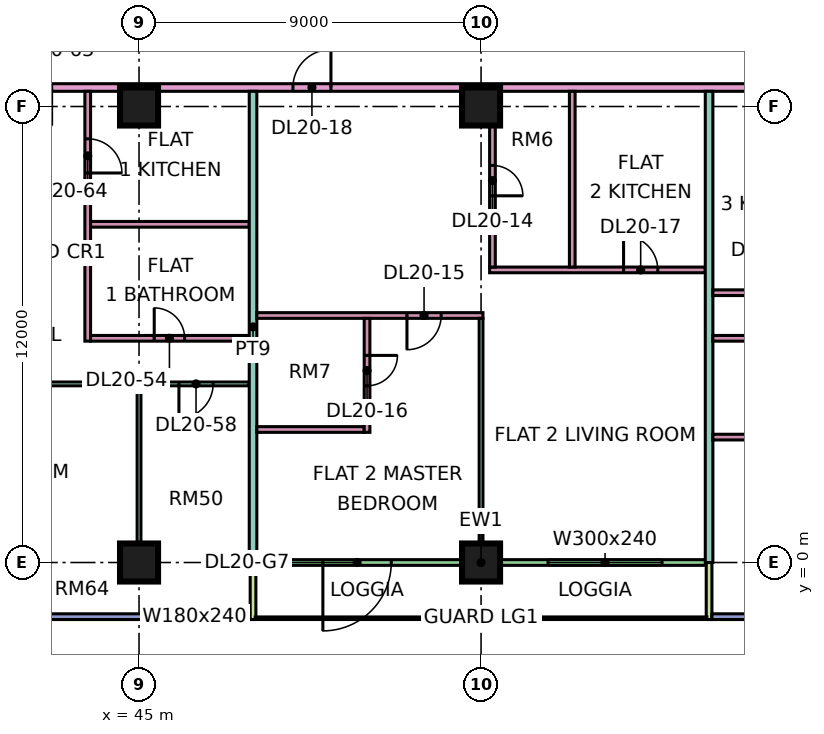
"""IFC4 building model, lengths in metres.
Left out: names, types, materials, properties, quantities, classifications, styles, units other than length and angle.
Written with IfcOpenShell. Run it as: python <this file> out.ifc"""

import sys

from ifc_helpers import new_model, si_unit, direction, frame, frame_2d, origin, origin_2d, place, context, subcontext, project, spatial, rectangle, extrude, element, fill, save


model = new_model("IFC4")
c1 = context("Model", 3, precision=1e-05, world=origin(), true_north=direction((0.0, 1.0)))
c2 = subcontext(c1, "Body", "Model", "MODEL_VIEW")
j1 = project(units=[si_unit("LENGTHUNIT", "METRE"), si_unit("PLANEANGLEUNIT", "RADIAN")], contexts=[c1])
p1 = place(None, origin())
s1 = spatial("IfcSite", under=j1, at=p1, CompositionType="ELEMENT")
p2 = place(p1, origin())
s2 = spatial("IfcBuilding", under=s1, at=p2, CompositionType="ELEMENT")
p3 = place(p2, frame((0.0, 0.0, 91.9)))
s3 = spatial("IfcBuildingStorey", under=s2, at=p3, CompositionType="ELEMENT", Elevation=91.9)
for number, where, z_axis, x_axis in (
    (1, (45.0, 0.0, 0.0), (0.0, 0.0, 1.0), (1.0, 0.0, 0.0)),
    (2, (45.0, 12.0, 0.0), (0.0, 0.0, 1.0), (1.0, 0.0, 0.0)),
    (3, (54.0, 0.0, 0.0), (0.0, 0.0, 1.0), (1.0, 0.0, 0.0)),
    (4, (54.0, 12.0, 0.0), (0.0, 0.0, 1.0), (1.0, 0.0, 0.0)),
):
    element("IfcColumn", number, at=place(p3, frame(where, z_axis=z_axis, x_axis=x_axis)), inside=s3, PredefinedType="COLUMN", context=c2, shape_type="SweptSolid", body=[
        extrude(rectangle(XDim=1.0, YDim=1.0, at=origin_2d()), origin(), (0.0, 0.0, 1.0), 3.75),
    ])
p4 = place(p3, frame((36.075, -1.425, 0.0), z_axis=(0.0, 0.0, 1.0), x_axis=(1.0, 0.0, 0.0)))
e5 = element("IfcWall", 5, at=p4, inside=s3, PredefinedType="SOLIDWALL", context=c2, shape_type="SweptSolid", body=[
    extrude(rectangle(XDim=11.85, YDim=0.15, at=frame_2d((5.925, 0.0))), origin(), (0.0, 0.0, 1.0), 3.35),
])
p5 = place(p4, frame((2.962, 0.0, 0.45)))
e6 = element("IfcOpeningElement", 6, at=p5, cuts=e5, PredefinedType="OPENING", context=c2, shape_type="SweptSolid", body=[
    extrude(rectangle(XDim=3.0, YDim=2.4, at=frame_2d((1.5, 1.2))), frame((0.0, 0.085, 0.0), z_axis=(0.0, -1.0, 0.0), x_axis=(1.0, 0.0, 0.0)), (0.0, 0.0, 1.0), 0.17),
])
p6 = place(p4, frame((9.488, 0.0, 0.45)))
e7 = element("IfcOpeningElement", 7, at=p6, cuts=e5, PredefinedType="OPENING", context=c2, shape_type="SweptSolid", body=[
    extrude(rectangle(XDim=1.8, YDim=2.4, at=frame_2d((0.9, 1.2))), frame((0.0, 0.085, 0.0), z_axis=(0.0, -1.0, 0.0), x_axis=(1.0, 0.0, 0.0)), (0.0, 0.0, 1.0), 0.17),
])
p7 = place(p3, frame((48.075, 0.0, 0.0), z_axis=(0.0, 0.0, 1.0), x_axis=(1.0, 0.0, 0.0)))
e8 = element("IfcWall", 8, at=p7, inside=s3, PredefinedType="SOLIDWALL", context=c2, shape_type="SweptSolid", body=[
    extrude(rectangle(XDim=11.85, YDim=0.15, at=frame_2d((5.925, 0.0))), origin(), (0.0, 0.0, 1.0), 3.35),
])
p8 = place(p7, frame((1.762, 0.0, 0.0)))
e9 = element("IfcOpeningElement", 9, at=p8, cuts=e8, PredefinedType="OPENING", context=c2, shape_type="SweptSolid", body=[
    extrude(rectangle(XDim=1.8, YDim=2.4, at=frame_2d((0.9, 1.2))), frame((0.0, 0.085, 0.0), z_axis=(0.0, -1.0, 0.0), x_axis=(1.0, 0.0, 0.0)), (0.0, 0.0, 1.0), 0.17),
])
p9 = place(p7, frame((7.688, 0.0, 0.45)))
e10 = element("IfcOpeningElement", 10, at=p9, cuts=e8, PredefinedType="OPENING", context=c2, shape_type="SweptSolid", body=[
    extrude(rectangle(XDim=3.0, YDim=2.4, at=frame_2d((1.5, 1.2))), frame((0.0, 0.085, 0.0), z_axis=(0.0, -1.0, 0.0), x_axis=(1.0, 0.0, 0.0)), (0.0, 0.0, 1.0), 0.17),
])
for number, where, z_axis, x_axis in (
    (11, (48.0, -1.5, 0.0), (0.0, 0.0, 1.0), (0.0, 1.0, 0.0)),
    (12, (60.0, -1.5, 0.0), (0.0, 0.0, 1.0), (0.0, 1.0, 0.0)),
):
    element("IfcWall", number, at=place(p3, frame(where, z_axis=z_axis, x_axis=x_axis)), inside=s3, PredefinedType="SOLIDWALL", context=c2, shape_type="SweptSolid", body=[
        extrude(rectangle(XDim=1.5, YDim=0.15, at=frame_2d((0.75, 0.0))), origin(), (0.0, 0.0, 1.0), 3.35),
    ])
p10 = place(p3, frame((60.075, -1.425, 0.0), z_axis=(0.0, 0.0, 1.0), x_axis=(1.0, 0.0, 0.0)))
e13 = element("IfcWall", 13, at=p10, inside=s3, PredefinedType="SOLIDWALL", context=c2, shape_type="SweptSolid", body=[
    extrude(rectangle(XDim=10.425, YDim=0.15, at=frame_2d((5.212, 0.0))), origin(), (0.0, 0.0, 1.0), 3.35),
])
p11 = place(p10, frame((1.462, 0.0, 0.45)))
e14 = element("IfcOpeningElement", 14, at=p11, cuts=e13, PredefinedType="OPENING", context=c2, shape_type="SweptSolid", body=[
    extrude(rectangle(XDim=3.0, YDim=2.4, at=frame_2d((1.5, 1.2))), frame((0.0, 0.085, 0.0), z_axis=(0.0, -1.0, 0.0), x_axis=(1.0, 0.0, 0.0)), (0.0, 0.0, 1.0), 0.17),
])
p12 = place(p10, frame((6.675, 0.0, 0.45)))
e15 = element("IfcOpeningElement", 15, at=p12, cuts=e13, PredefinedType="OPENING", context=c2, shape_type="SweptSolid", body=[
    extrude(rectangle(XDim=3.0, YDim=2.4, at=frame_2d((1.5, 1.2))), frame((0.0, 0.085, 0.0), z_axis=(0.0, -1.0, 0.0), x_axis=(1.0, 0.0, 0.0)), (0.0, 0.0, 1.0), 0.17),
])
p13 = place(p3, frame((33.05, 4.7, 0.0), z_axis=(0.0, 0.0, 1.0), x_axis=(1.0, 0.0, 0.0)))
e16 = element("IfcWall", 16, at=p13, inside=s3, PredefinedType="PARTITIONING", context=c2, shape_type="SweptSolid", body=[
    extrude(rectangle(XDim=14.85, YDim=0.1, at=frame_2d((7.425, 0.0))), origin(), (0.0, 0.0, 1.0), 3.35),
])
p14 = place(p13, frame((1.0, 0.0, 0.0)))
e17 = element("IfcOpeningElement", 17, at=p14, cuts=e16, PredefinedType="OPENING", context=c2, shape_type="SweptSolid", body=[
    extrude(rectangle(XDim=0.9, YDim=2.1, at=frame_2d((0.45, 1.05))), frame((0.0, 0.06, 0.0), z_axis=(0.0, -1.0, 0.0), x_axis=(1.0, 0.0, 0.0)), (0.0, 0.0, 1.0), 0.12),
])
p15 = place(p13, frame((13.0, 0.0, 0.0)))
e18 = element("IfcOpeningElement", 18, at=p15, cuts=e16, PredefinedType="OPENING", context=c2, shape_type="SweptSolid", body=[
    extrude(rectangle(XDim=0.9, YDim=2.1, at=frame_2d((0.45, 1.05))), frame((0.0, 0.06, 0.0), z_axis=(0.0, -1.0, 0.0), x_axis=(1.0, 0.0, 0.0)), (0.0, 0.0, 1.0), 0.12),
])
p16 = place(p13, frame((7.0, 0.0, 0.0)))
e19 = element("IfcOpeningElement", 19, at=p16, cuts=e16, PredefinedType="OPENING", context=c2, shape_type="SweptSolid", body=[
    extrude(rectangle(XDim=0.9, YDim=2.1, at=frame_2d((0.45, 1.05))), frame((0.0, 0.06, 0.0), z_axis=(0.0, -1.0, 0.0), x_axis=(1.0, 0.0, 0.0)), (0.0, 0.0, 1.0), 0.12),
])
p17 = place(p3, frame((40.65, 12.5, 0.0), z_axis=(0.0, 0.0, 1.0), x_axis=(1.0, 0.0, 0.0)))
e20 = element("IfcWall", 20, at=p17, inside=s3, PredefinedType="PARTITIONING", context=c2, shape_type="SweptSolid", body=[
    extrude(rectangle(XDim=24.825, YDim=0.2, at=frame_2d((12.413, 0.0))), origin(), (0.0, 0.0, 1.0), 3.35),
])
p18 = place(p17, frame((8.4, 0.0, 0.0)))
e21 = element("IfcOpeningElement", 21, at=p18, cuts=e20, PredefinedType="OPENING", context=c2, shape_type="SweptSolid", body=[
    extrude(rectangle(XDim=1.0, YDim=2.1, at=frame_2d((0.5, 1.05))), frame((0.0, 0.11, 0.0), z_axis=(0.0, -1.0, 0.0), x_axis=(1.0, 0.0, 0.0)), (0.0, 0.0, 1.0), 0.22),
])
p19 = place(p17, frame((1.05, 0.0, 0.0)))
e22 = element("IfcOpeningElement", 22, at=p19, cuts=e20, PredefinedType="OPENING", context=c2, shape_type="SweptSolid", body=[
    extrude(rectangle(XDim=1.0, YDim=2.1, at=frame_2d((0.5, 1.05))), frame((0.0, 0.11, 0.0), z_axis=(0.0, -1.0, 0.0), x_axis=(1.0, 0.0, 0.0)), (0.0, 0.0, 1.0), 0.22),
])
p20 = place(p3, frame((43.65, 5.825, 0.0), z_axis=(0.0, 0.0, 1.0), x_axis=(0.0, 1.0, 0.0)))
e23 = element("IfcWall", 23, at=p20, inside=s3, PredefinedType="PARTITIONING", context=c2, shape_type="SweptSolid", body=[
    extrude(rectangle(XDim=6.575, YDim=0.15, at=frame_2d((3.288, 0.0))), origin(), (0.0, 0.0, 1.0), 3.35),
])
p21 = place(p20, frame((4.425, 0.0, 0.0)))
e24 = element("IfcOpeningElement", 24, at=p21, cuts=e23, PredefinedType="OPENING", context=c2, shape_type="SweptSolid", body=[
    extrude(rectangle(XDim=0.9, YDim=2.1, at=frame_2d((0.45, 1.05))), frame((0.0, 0.085, 0.0), z_axis=(0.0, -1.0, 0.0), x_axis=(1.0, 0.0, 0.0)), (0.0, 0.0, 1.0), 0.17),
])
p22 = place(p3, frame((43.725, 5.9, 0.0), z_axis=(0.0, 0.0, 1.0), x_axis=(1.0, 0.0, 0.0)))
e25 = element("IfcWall", 25, at=p22, inside=s3, PredefinedType="PARTITIONING", context=c2, shape_type="SweptSolid", body=[
    extrude(rectangle(XDim=4.175, YDim=0.15, at=frame_2d((2.087, 0.0))), origin(), (0.0, 0.0, 1.0), 3.35),
])
p23 = place(p22, frame((1.675, 0.0, 0.0)))
e26 = element("IfcOpeningElement", 26, at=p23, cuts=e25, PredefinedType="OPENING", context=c2, shape_type="SweptSolid", body=[
    extrude(rectangle(XDim=0.8, YDim=2.1, at=frame_2d((0.4, 1.05))), frame((0.0, 0.085, 0.0), z_axis=(0.0, -1.0, 0.0), x_axis=(1.0, 0.0, 0.0)), (0.0, 0.0, 1.0), 0.17),
])
p24 = place(p3, frame((43.725, 8.9, 0.0), z_axis=(0.0, 0.0, 1.0), x_axis=(1.0, 0.0, 0.0)))
e27 = element("IfcWall", 27, at=p24, inside=s3, PredefinedType="PARTITIONING", context=c2, shape_type="SweptSolid", body=[
    extrude(rectangle(XDim=4.175, YDim=0.15, at=frame_2d((2.087, 0.0))), origin(), (0.0, 0.0, 1.0), 3.35),
])
p25 = place(p3, frame((45.0, 0.0, 0.0), z_axis=(0.0, 0.0, 1.0), x_axis=(0.0, 1.0, 0.0)))
e28 = element("IfcWall", 28, at=p25, inside=s3, PredefinedType="PARTITIONING", context=c2, shape_type="SweptSolid", body=[
    extrude(rectangle(XDim=4.65, YDim=0.1, at=frame_2d((2.325, 0.0))), origin(), (0.0, 0.0, 1.0), 3.35),
])
p26 = place(p3, frame((48.0, 0.0, 0.0), z_axis=(0.0, 0.0, 1.0), x_axis=(0.0, 1.0, 0.0)))
e29 = element("IfcWall", 29, at=p26, inside=s3, PredefinedType="PARTITIONING", context=c2, shape_type="SweptSolid", body=[
    extrude(rectangle(XDim=12.4, YDim=0.2, at=frame_2d((6.2, 0.0))), origin(), (0.0, 0.0, 1.0), 3.35),
])
p27 = place(p3, frame((48.1, 3.5, 0.0), z_axis=(0.0, 0.0, 1.0), x_axis=(1.0, 0.0, 0.0)))
e30 = element("IfcWall", 30, at=p27, inside=s3, PredefinedType="PARTITIONING", context=c2, shape_type="SweptSolid", body=[
    extrude(rectangle(XDim=2.825, YDim=0.15, at=frame_2d((1.413, 0.0))), origin(), (0.0, 0.0, 1.0), 3.35),
])
p28 = place(p3, frame((48.1, 6.5, 0.0), z_axis=(0.0, 0.0, 1.0), x_axis=(1.0, 0.0, 0.0)))
e31 = element("IfcWall", 31, at=p28, inside=s3, PredefinedType="PARTITIONING", context=c2, shape_type="SweptSolid", body=[
    extrude(rectangle(XDim=5.95, YDim=0.15, at=frame_2d((2.975, 0.0))), origin(), (0.0, 0.0, 1.0), 3.35),
])
p29 = place(p28, frame((3.95, 0.0, 0.0)))
e32 = element("IfcOpeningElement", 32, at=p29, cuts=e31, PredefinedType="OPENING", context=c2, shape_type="SweptSolid", body=[
    extrude(rectangle(XDim=0.9, YDim=2.1, at=frame_2d((0.45, 1.05))), frame((0.0, 0.085, 0.0), z_axis=(0.0, -1.0, 0.0), x_axis=(1.0, 0.0, 0.0)), (0.0, 0.0, 1.0), 0.17),
])
p30 = place(p3, frame((51.0, 3.425, 0.0), z_axis=(0.0, 0.0, 1.0), x_axis=(0.0, 1.0, 0.0)))
e33 = element("IfcWall", 33, at=p30, inside=s3, PredefinedType="PARTITIONING", context=c2, shape_type="SweptSolid", body=[
    extrude(rectangle(XDim=3.0, YDim=0.15, at=frame_2d((1.5, 0.0))), origin(), (0.0, 0.0, 1.0), 3.35),
])
p31 = place(p30, frame((1.225, 0.0, 0.0)))
e34 = element("IfcOpeningElement", 34, at=p31, cuts=e33, PredefinedType="OPENING", context=c2, shape_type="SweptSolid", body=[
    extrude(rectangle(XDim=0.8, YDim=2.1, at=frame_2d((0.4, 1.05))), frame((0.0, 0.085, 0.0), z_axis=(0.0, -1.0, 0.0), x_axis=(1.0, 0.0, 0.0)), (0.0, 0.0, 1.0), 0.17),
])
p32 = place(p3, frame((54.0, 0.074, 0.0), z_axis=(0.0, 0.0, 1.0), x_axis=(0.0, 1.0, 0.0)))
e35 = element("IfcWall", 35, at=p32, inside=s3, PredefinedType="PARTITIONING", context=c2, shape_type="SweptSolid", body=[
    extrude(rectangle(XDim=6.351, YDim=0.1, at=frame_2d((3.176, 0.0))), origin(), (0.0, 0.0, 1.0), 3.35),
])
p33 = place(p3, frame((54.225, 7.7, 0.0), z_axis=(0.0, 0.0, 1.0), x_axis=(1.0, 0.0, 0.0)))
e36 = element("IfcWall", 36, at=p33, inside=s3, PredefinedType="PARTITIONING", context=c2, shape_type="SweptSolid", body=[
    extrude(rectangle(XDim=5.675, YDim=0.15, at=frame_2d((2.837, 0.0))), origin(), (0.0, 0.0, 1.0), 3.35),
])
p34 = place(p33, frame((3.525, 0.0, 0.0)))
e37 = element("IfcOpeningElement", 37, at=p34, cuts=e36, PredefinedType="OPENING", context=c2, shape_type="SweptSolid", body=[
    extrude(rectangle(XDim=0.9, YDim=2.1, at=frame_2d((0.45, 1.05))), frame((0.0, 0.085, 0.0), z_axis=(0.0, -1.0, 0.0), x_axis=(1.0, 0.0, 0.0)), (0.0, 0.0, 1.0), 0.17),
])
p35 = place(p3, frame((54.3, 7.775, 0.0), z_axis=(0.0, 0.0, 1.0), x_axis=(0.0, 1.0, 0.0)))
e38 = element("IfcWall", 38, at=p35, inside=s3, PredefinedType="PARTITIONING", context=c2, shape_type="SweptSolid", body=[
    extrude(rectangle(XDim=4.625, YDim=0.15, at=frame_2d((2.312, 0.0))), origin(), (0.0, 0.0, 1.0), 3.35),
])
p36 = place(p35, frame((1.875, 0.0, 0.0)))
e39 = element("IfcOpeningElement", 39, at=p36, cuts=e38, PredefinedType="OPENING", context=c2, shape_type="SweptSolid", body=[
    extrude(rectangle(XDim=0.8, YDim=2.1, at=frame_2d((0.4, 1.05))), frame((0.0, 0.085, 0.0), z_axis=(0.0, -1.0, 0.0), x_axis=(1.0, 0.0, 0.0)), (0.0, 0.0, 1.0), 0.17),
])
p37 = place(p3, frame((56.4, 7.775, 0.0), z_axis=(0.0, 0.0, 1.0), x_axis=(0.0, 1.0, 0.0)))
e40 = element("IfcWall", 40, at=p37, inside=s3, PredefinedType="PARTITIONING", context=c2, shape_type="SweptSolid", body=[
    extrude(rectangle(XDim=4.625, YDim=0.15, at=frame_2d((2.312, 0.0))), origin(), (0.0, 0.0, 1.0), 3.35),
])
p38 = place(p3, frame((60.0, 0.0, 0.0), z_axis=(0.0, 0.0, 1.0), x_axis=(0.0, 1.0, 0.0)))
e41 = element("IfcWall", 41, at=p38, inside=s3, PredefinedType="PARTITIONING", context=c2, shape_type="SweptSolid", body=[
    extrude(rectangle(XDim=12.4, YDim=0.2, at=frame_2d((6.2, 0.0))), origin(), (0.0, 0.0, 1.0), 3.35),
])
p39 = place(p3, frame((60.1, 3.3, 0.0), z_axis=(0.0, 0.0, 1.0), x_axis=(1.0, 0.0, 0.0)))
e42 = element("IfcWall", 42, at=p39, inside=s3, PredefinedType="PARTITIONING", context=c2, shape_type="SweptSolid", body=[
    extrude(rectangle(XDim=2.975, YDim=0.15, at=frame_2d((1.487, 0.0))), origin(), (0.0, 0.0, 1.0), 3.35),
])
p40 = place(p3, frame((60.1, 5.9, 0.0), z_axis=(0.0, 0.0, 1.0), x_axis=(1.0, 0.0, 0.0)))
e43 = element("IfcWall", 43, at=p40, inside=s3, PredefinedType="PARTITIONING", context=c2, shape_type="SweptSolid", body=[
    extrude(rectangle(XDim=5.95, YDim=0.15, at=frame_2d((2.975, 0.0))), origin(), (0.0, 0.0, 1.0), 3.35),
])
p41 = place(p40, frame((3.95, 0.0, 0.0)))
e44 = element("IfcOpeningElement", 44, at=p41, cuts=e43, PredefinedType="OPENING", context=c2, shape_type="SweptSolid", body=[
    extrude(rectangle(XDim=0.9, YDim=2.1, at=frame_2d((0.45, 1.05))), frame((0.0, 0.085, 0.0), z_axis=(0.0, -1.0, 0.0), x_axis=(1.0, 0.0, 0.0)), (0.0, 0.0, 1.0), 0.17),
])
p42 = place(p3, frame((60.1, 7.1, 0.0), z_axis=(0.0, 0.0, 1.0), x_axis=(1.0, 0.0, 0.0)))
e45 = element("IfcWall", 45, at=p42, inside=s3, PredefinedType="PARTITIONING", context=c2, shape_type="SweptSolid", body=[
    extrude(rectangle(XDim=5.375, YDim=0.15, at=frame_2d((2.688, 0.0))), origin(), (0.0, 0.0, 1.0), 3.35),
])
p43 = place(p42, frame((3.8, 0.0, 0.0)))
e46 = element("IfcOpeningElement", 46, at=p43, cuts=e45, PredefinedType="OPENING", context=c2, shape_type="SweptSolid", body=[
    extrude(rectangle(XDim=0.8, YDim=2.1, at=frame_2d((0.4, 1.05))), frame((0.0, 0.085, 0.0), z_axis=(0.0, -1.0, 0.0), x_axis=(1.0, 0.0, 0.0)), (0.0, 0.0, 1.0), 0.17),
])
p44 = place(p42, frame((1.1, 0.0, 0.0)))
e47 = element("IfcOpeningElement", 47, at=p44, cuts=e45, PredefinedType="OPENING", context=c2, shape_type="SweptSolid", body=[
    extrude(rectangle(XDim=0.9, YDim=2.1, at=frame_2d((0.45, 1.05))), frame((0.0, 0.085, 0.0), z_axis=(0.0, -1.0, 0.0), x_axis=(1.0, 0.0, 0.0)), (0.0, 0.0, 1.0), 0.17),
])
p45 = place(p6, origin())
e48 = element("IfcWindow", 48, at=p45, inside=s3, PartitioningType="SINGLE_PANEL", PredefinedType="WINDOW", context=c2, shape_type="SweptSolid", body=[
    extrude(rectangle(XDim=1.8, YDim=2.4, at=frame_2d((0.9, 1.2))), frame((0.0, 0.03, 0.0), z_axis=(0.0, -1.0, 0.0), x_axis=(1.0, 0.0, 0.0)), (0.0, 0.0, 1.0), 0.06),
])
fill(e7, e48)
p46 = place(p8, frame((1.8, 0.0, 0.0), z_axis=(0.0, 0.0, 1.0), x_axis=(-1.0, 0.0, 0.0)))
e49 = element("IfcDoor", 49, at=p46, inside=s3, OperationType="DOUBLE_DOOR_SINGLE_SWING", PredefinedType="DOOR", context=c2, shape_type="SweptSolid", body=[
    extrude(rectangle(XDim=1.8, YDim=2.4, at=frame_2d((0.9, 1.2))), frame((0.0, 0.025, 0.0), z_axis=(0.0, -1.0, 0.0), x_axis=(1.0, 0.0, 0.0)), (0.0, 0.0, 1.0), 0.05),
])
fill(e9, e49)
p47 = place(p9, origin())
e50 = element("IfcWindow", 50, at=p47, inside=s3, PartitioningType="SINGLE_PANEL", PredefinedType="WINDOW", context=c2, shape_type="SweptSolid", body=[
    extrude(rectangle(XDim=3.0, YDim=2.4, at=frame_2d((1.5, 1.2))), frame((0.0, 0.03, 0.0), z_axis=(0.0, -1.0, 0.0), x_axis=(1.0, 0.0, 0.0)), (0.0, 0.0, 1.0), 0.06),
])
fill(e10, e50)
p48 = place(p36, frame((0.8, 0.0, 0.0), z_axis=(0.0, 0.0, 1.0), x_axis=(-1.0, 0.0, 0.0)))
e51 = element("IfcDoor", 51, at=p48, inside=s3, OperationType="SINGLE_SWING_LEFT", PredefinedType="DOOR", context=c2, shape_type="SweptSolid", body=[
    extrude(rectangle(XDim=0.8, YDim=2.1, at=frame_2d((0.4, 1.05))), frame((0.0, 0.025, 0.0), z_axis=(0.0, -1.0, 0.0), x_axis=(1.0, 0.0, 0.0)), (0.0, 0.0, 1.0), 0.05),
])
fill(e39, e51)
p49 = place(p29, frame((0.9, 0.0, 0.0), z_axis=(0.0, 0.0, 1.0), x_axis=(-1.0, 0.0, 0.0)))
e52 = element("IfcDoor", 52, at=p49, inside=s3, OperationType="SINGLE_SWING_LEFT", PredefinedType="DOOR", context=c2, shape_type="SweptSolid", body=[
    extrude(rectangle(XDim=0.9, YDim=2.1, at=frame_2d((0.45, 1.05))), frame((0.0, 0.025, 0.0), z_axis=(0.0, -1.0, 0.0), x_axis=(1.0, 0.0, 0.0)), (0.0, 0.0, 1.0), 0.05),
])
fill(e32, e52)
p50 = place(p31, origin())
e53 = element("IfcDoor", 53, at=p50, inside=s3, OperationType="SINGLE_SWING_RIGHT", PredefinedType="DOOR", context=c2, shape_type="SweptSolid", body=[
    extrude(rectangle(XDim=0.8, YDim=2.1, at=frame_2d((0.4, 1.05))), frame((0.0, 0.025, 0.0), z_axis=(0.0, -1.0, 0.0), x_axis=(1.0, 0.0, 0.0)), (0.0, 0.0, 1.0), 0.05),
])
fill(e34, e53)
p51 = place(p34, origin())
e54 = element("IfcDoor", 54, at=p51, inside=s3, OperationType="SINGLE_SWING_LEFT", PredefinedType="DOOR", context=c2, shape_type="SweptSolid", body=[
    extrude(rectangle(XDim=0.9, YDim=2.1, at=frame_2d((0.45, 1.05))), frame((0.0, 0.025, 0.0), z_axis=(0.0, -1.0, 0.0), x_axis=(1.0, 0.0, 0.0)), (0.0, 0.0, 1.0), 0.05),
])
fill(e37, e54)
p52 = place(p18, frame((1.0, 0.0, 0.0), z_axis=(0.0, 0.0, 1.0), x_axis=(-1.0, 0.0, 0.0)))
e55 = element("IfcDoor", 55, at=p52, inside=s3, OperationType="SINGLE_SWING_RIGHT", PredefinedType="DOOR", context=c2, shape_type="SweptSolid", body=[
    extrude(rectangle(XDim=1.0, YDim=2.1, at=frame_2d((0.5, 1.05))), frame((0.0, 0.025, 0.0), z_axis=(0.0, -1.0, 0.0), x_axis=(1.0, 0.0, 0.0)), (0.0, 0.0, 1.0), 0.05),
])
fill(e21, e55)
p53 = place(p23, origin())
e56 = element("IfcDoor", 56, at=p53, inside=s3, OperationType="SINGLE_SWING_LEFT", PredefinedType="DOOR", context=c2, shape_type="SweptSolid", body=[
    extrude(rectangle(XDim=0.8, YDim=2.1, at=frame_2d((0.4, 1.05))), frame((0.0, 0.025, 0.0), z_axis=(0.0, -1.0, 0.0), x_axis=(1.0, 0.0, 0.0)), (0.0, 0.0, 1.0), 0.05),
])
fill(e26, e56)
p54 = place(p15, frame((0.9, 0.0, 0.0), z_axis=(0.0, 0.0, 1.0), x_axis=(-1.0, 0.0, 0.0)))
e57 = element("IfcDoor", 57, at=p54, inside=s3, OperationType="SINGLE_SWING_LEFT", PredefinedType="DOOR", context=c2, shape_type="SweptSolid", body=[
    extrude(rectangle(XDim=0.9, YDim=2.1, at=frame_2d((0.45, 1.05))), frame((0.0, 0.025, 0.0), z_axis=(0.0, -1.0, 0.0), x_axis=(1.0, 0.0, 0.0)), (0.0, 0.0, 1.0), 0.05),
])
fill(e18, e57)
p55 = place(p21, frame((0.9, 0.0, 0.0), z_axis=(0.0, 0.0, 1.0), x_axis=(-1.0, 0.0, 0.0)))
e58 = element("IfcDoor", 58, at=p55, inside=s3, OperationType="SINGLE_SWING_LEFT", PredefinedType="DOOR", context=c2, shape_type="SweptSolid", body=[
    extrude(rectangle(XDim=0.9, YDim=2.1, at=frame_2d((0.45, 1.05))), frame((0.0, 0.025, 0.0), z_axis=(0.0, -1.0, 0.0), x_axis=(1.0, 0.0, 0.0)), (0.0, 0.0, 1.0), 0.05),
])
fill(e24, e58)
save(model, sys.argv[1])
